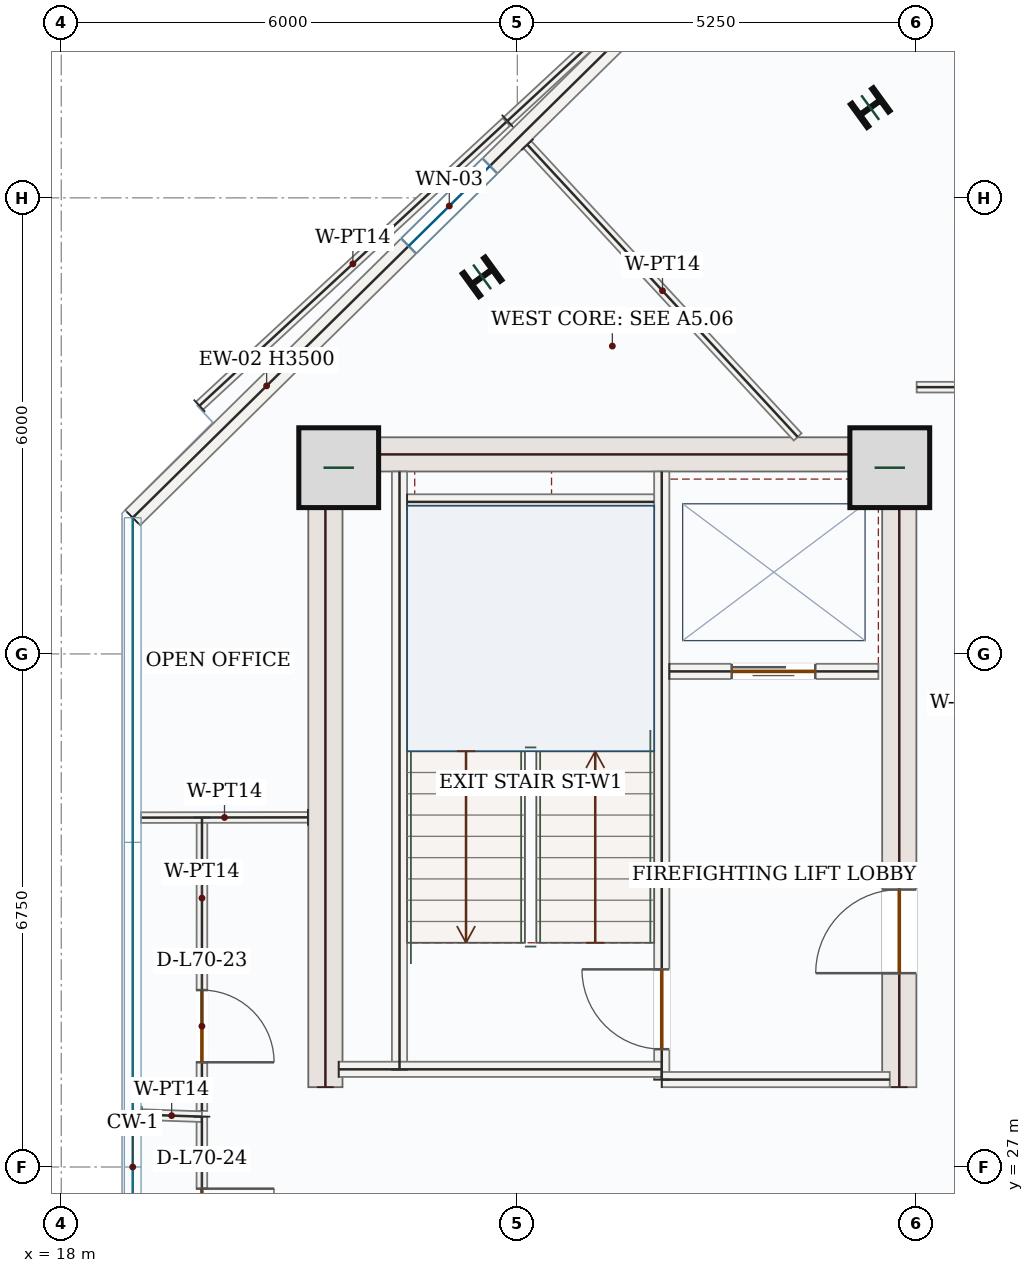
"""IFC4 building model, lengths in metres.
Left out: names, types, materials, properties, quantities, classifications, styles, units other than length and angle.
Written with IfcOpenShell. Run it as: python <this file> out.ifc"""

import sys

from ifc_helpers import new_model, si_unit, direction, frame, frame_2d, origin, origin_2d, place, context, subcontext, project, spatial, rectangle, i_section, extrude, source, transform, mapped, element, fill, save


model = new_model("IFC4")
c1 = context("Model", 3, precision=1e-05, world=origin(), true_north=direction((0.0, 1.0)))
c2 = subcontext(c1, "Body", "Model", "MODEL_VIEW")
j1 = project(units=[si_unit("LENGTHUNIT", "METRE"), si_unit("PLANEANGLEUNIT", "RADIAN")], contexts=[c1])
p1 = place(None, origin())
s1 = spatial("IfcSite", under=j1, at=p1, CompositionType="ELEMENT")
p2 = place(p1, origin())
s2 = spatial("IfcBuilding", under=s1, at=p2, CompositionType="ELEMENT")
p3 = place(p2, frame((0.0, 0.0, 291.6)))
s3 = spatial("IfcBuildingStorey", under=s2, at=p3, CompositionType="ELEMENT", Elevation=291.6)
m1 = source(origin(), c2, "Body", "SweptSolid", [
    extrude(rectangle(XDim=8.55, YDim=0.45, at=frame_2d((4.275, 0.0))), origin(), (0.0, 0.0, 1.0), 3.5),
])
p4 = place(p3, frame((21.475, 28.05, 0.0), z_axis=(0.0, 0.0, 1.0), x_axis=(0.0, 1.0, 0.0)))
e1 = element("IfcWall", 1, at=p4, inside=s3, PredefinedType="SHEAR", context=c2, shape_type="MappedRepresentation", body=[
    mapped(m1, transform((0.0, 0.0, 0.0), x_axis=(1.0, 0.0, 0.0), y_axis=(0.0, 1.0, 0.0), z_axis=(0.0, 0.0, 1.0), scale=1.0)),
])
p5 = place(p3, frame((29.025, 28.05, 0.0), z_axis=(0.0, 0.0, 1.0), x_axis=(0.0, 1.0, 0.0)))
e2 = element("IfcWall", 2, at=p5, inside=s3, PredefinedType="SHEAR", context=c2, shape_type="SweptSolid", body=[
    extrude(rectangle(XDim=8.55, YDim=0.45, at=frame_2d((4.275, 0.0))), origin(), (0.0, 0.0, 1.0), 3.5),
])
p6 = place(p5, frame((1.5, 0.0, 0.0)))
e3 = element("IfcOpeningElement", 3, at=p6, cuts=e2, PredefinedType="OPENING", context=c2, shape_type="SweptSolid", body=[
    extrude(rectangle(XDim=1.1, YDim=2.2, at=frame_2d((0.55, 1.1))), frame((0.0, 0.235, 0.0), z_axis=(0.0, -1.0, 0.0), x_axis=(1.0, 0.0, 0.0)), (0.0, 0.0, 1.0), 0.47),
])
m2 = source(origin(), c2, "Body", "SweptSolid", [
    extrude(rectangle(XDim=7.1, YDim=0.45, at=frame_2d((3.55, 0.0))), origin(), (0.0, 0.0, 1.0), 3.5),
])
p7 = place(p3, frame((21.7, 36.375, 0.0), z_axis=(0.0, 0.0, 1.0), x_axis=(1.0, 0.0, 0.0)))
e4 = element("IfcWall", 4, at=p7, inside=s3, PredefinedType="SHEAR", context=c2, shape_type="MappedRepresentation", body=[
    mapped(m2, transform((0.0, 0.0, 0.0), x_axis=(1.0, 0.0, 0.0), y_axis=(0.0, 1.0, 0.0), z_axis=(0.0, 0.0, 1.0), scale=1.0)),
])
m3 = source(origin(), c2, "Body", "SweptSolid", [
    extrude(rectangle(XDim=1.05, YDim=1.05, at=origin_2d()), origin(), (0.0, 0.0, 1.0), 3.75),
])
for number, where, z_axis, x_axis in (
    (5, (21.65, 36.2, 0.0), (0.0, 0.0, 1.0), (1.0, 0.0, 0.0)),
    (6, (28.9, 36.2, 0.0), (0.0, 0.0, 1.0), (1.0, 0.0, 0.0)),
):
    element("IfcColumn", number, at=place(p3, frame(where, z_axis=z_axis, x_axis=x_axis)), inside=s3, PredefinedType="COLUMN", context=c2, shape_type="MappedRepresentation", body=[
        mapped(m3, transform((0.0, 0.0, 0.0), x_axis=(1.0, 0.0, 0.0), y_axis=(0.0, 1.0, 0.0), z_axis=(0.0, 0.0, 1.0), scale=1.0)),
    ])
m4 = source(origin(), c2, "Body", "SweptSolid", [
    extrude(i_section(OverallWidth=0.374, OverallDepth=0.372, WebThickness=0.016, FlangeThickness=0.026, FilletRadius=0.018, at=origin_2d()), origin(), (0.0, 0.0, 1.0), 3.75),
])
for number, where, z_axis, x_axis in (
    (7, (28.643, 40.937, 0.0), (0.0, 0.0, 1.0), (-0.588, 0.809, 0.0)),
    (8, (23.536, 38.711, 0.0), (0.0, 0.0, 1.0), (-0.588, 0.809, 0.0)),
):
    element("IfcColumn", number, at=place(p3, frame(where, z_axis=z_axis, x_axis=x_axis)), inside=s3, PredefinedType="COLUMN", context=c2, shape_type="MappedRepresentation", body=[
        mapped(m4, transform((0.0, 0.0, 0.0), x_axis=(1.0, 0.0, 0.0), y_axis=(0.0, 1.0, 0.0), z_axis=(0.0, 0.0, 1.0), scale=1.0)),
    ])
p8 = place(p3, frame((18.94, 35.542, 0.0), z_axis=(0.0, 0.0, 1.0), x_axis=(0.712557502542, 0.701613715353, 0.0)))
e9 = element("IfcWall", 9, at=p8, inside=s3, PredefinedType="SOLIDWALL", context=c2, shape_type="SweptSolid", body=[
    extrude(rectangle(XDim=11.69, YDim=0.28, at=frame_2d((5.845, 0.0))), origin(), (0.0, 0.0, 1.0), 3.5),
])
p9 = place(p8, frame((5.095, 0.0, 0.85)))
e10 = element("IfcOpeningElement", 10, at=p9, cuts=e9, PredefinedType="OPENING", context=c2, shape_type="SweptSolid", body=[
    extrude(rectangle(XDim=1.5, YDim=1.5, at=frame_2d((0.75, 0.75))), frame((0.0, 0.15, 0.0), z_axis=(0.0, -1.0, 0.0), x_axis=(1.0, 0.0, 0.0)), (0.0, 0.0, 1.0), 0.3),
])
p10 = place(p3, frame((29.672, 43.65, 0.0), z_axis=(0.0, 0.0, 1.0), x_axis=(0.679010627727, -0.734128440693, 0.0)))
e11 = element("IfcWall", 11, at=p10, inside=s3, PredefinedType="SOLIDWALL", context=c2, shape_type="SweptSolid", body=[
    extrude(rectangle(XDim=5.98, YDim=0.28, at=frame_2d((2.99, 0.0))), origin(), (0.0, 0.0, 1.0), 3.5),
])
p11 = place(p10, frame((2.24, 0.0, 0.85)))
e12 = element("IfcOpeningElement", 12, at=p11, cuts=e11, PredefinedType="OPENING", context=c2, shape_type="SweptSolid", body=[
    extrude(rectangle(XDim=1.5, YDim=1.5, at=frame_2d((0.75, 0.75))), frame((0.0, 0.15, 0.0), z_axis=(0.0, -1.0, 0.0), x_axis=(1.0, 0.0, 0.0)), (0.0, 0.0, 1.0), 0.3),
])
m5 = source(origin(), c2, "Body", "SweptSolid", [
    extrude(rectangle(XDim=7.87, YDim=0.2, at=frame_2d((3.935, 0.0))), origin(), (0.0, 0.0, 1.0), 3.5),
])
p12 = place(p3, frame((22.45, 28.28, 0.0), z_axis=(0.0, 0.0, 1.0), x_axis=(0.0, 1.0, 0.0)))
e13 = element("IfcWall", 13, at=p12, inside=s3, PredefinedType="SOLIDWALL", context=c2, shape_type="MappedRepresentation", body=[
    mapped(m5, transform((0.0, 0.0, 0.0), x_axis=(1.0, 0.0, 0.0), y_axis=(0.0, 1.0, 0.0), z_axis=(0.0, 0.0, 1.0), scale=1.0)),
])
p13 = place(p3, frame((25.9, 28.15, 0.0), z_axis=(0.0, 0.0, 1.0), x_axis=(0.0, 1.0, 0.0)))
e14 = element("IfcWall", 14, at=p13, inside=s3, PredefinedType="SOLIDWALL", context=c2, shape_type="SweptSolid", body=[
    extrude(rectangle(XDim=8.0, YDim=0.2, at=frame_2d((4.0, 0.0))), origin(), (0.0, 0.0, 1.0), 3.5),
])
p14 = place(p13, frame((0.4, 0.0, 0.0)))
e15 = element("IfcOpeningElement", 15, at=p14, cuts=e14, PredefinedType="OPENING", context=c2, shape_type="SweptSolid", body=[
    extrude(rectangle(XDim=1.05, YDim=2.15, at=frame_2d((0.525, 1.075))), frame((0.0, 0.11, 0.0), z_axis=(0.0, -1.0, 0.0), x_axis=(1.0, 0.0, 0.0)), (0.0, 0.0, 1.0), 0.22),
])
m6 = source(origin(), c2, "Body", "SweptSolid", [
    extrude(rectangle(XDim=4.25, YDim=0.2, at=frame_2d((2.125, 0.0))), origin(), (0.0, 0.0, 1.0), 3.5),
])
p15 = place(p3, frame((21.65, 28.285, 0.0), z_axis=(0.0, 0.0, 1.0), x_axis=(1.0, 0.0, 0.0)))
e16 = element("IfcWall", 16, at=p15, inside=s3, PredefinedType="SOLIDWALL", context=c2, shape_type="MappedRepresentation", body=[
    mapped(m6, transform((0.0, 0.0, 0.0), x_axis=(1.0, 0.0, 0.0), y_axis=(0.0, 1.0, 0.0), z_axis=(0.0, 0.0, 1.0), scale=1.0)),
])
m7 = source(origin(), c2, "Body", "SweptSolid", [
    extrude(rectangle(XDim=3.0, YDim=0.2, at=frame_2d((1.5, 0.0))), origin(), (0.0, 0.0, 1.0), 3.5),
])
p16 = place(p3, frame((25.9, 28.15, 0.0), z_axis=(0.0, 0.0, 1.0), x_axis=(1.0, 0.0, 0.0)))
e17 = element("IfcWall", 17, at=p16, inside=s3, PredefinedType="SOLIDWALL", context=c2, shape_type="MappedRepresentation", body=[
    mapped(m7, transform((0.0, 0.0, 0.0), x_axis=(1.0, 0.0, 0.0), y_axis=(0.0, 1.0, 0.0), z_axis=(0.0, 0.0, 1.0), scale=1.0)),
])
m8 = source(origin(), c2, "Body", "SweptSolid", [
    extrude(rectangle(XDim=3.25, YDim=0.2, at=frame_2d((1.625, 0.0))), origin(), (0.0, 0.0, 1.0), 3.5),
])
p17 = place(p3, frame((22.55, 35.75, 0.0), z_axis=(0.0, 0.0, 1.0), x_axis=(1.0, 0.0, 0.0)))
e18 = element("IfcWall", 18, at=p17, inside=s3, PredefinedType="SOLIDWALL", context=c2, shape_type="MappedRepresentation", body=[
    mapped(m8, transform((0.0, 0.0, 0.0), x_axis=(1.0, 0.0, 0.0), y_axis=(0.0, 1.0, 0.0), z_axis=(0.0, 0.0, 1.0), scale=1.0)),
])
p18 = place(p3, frame((26.0, 33.52, 0.0), z_axis=(0.0, 0.0, 1.0), x_axis=(1.0, 0.0, 0.0)))
e19 = element("IfcWall", 19, at=p18, inside=s3, PredefinedType="SOLIDWALL", context=c2, shape_type="SweptSolid", body=[
    extrude(rectangle(XDim=2.75, YDim=0.2, at=frame_2d((1.375, 0.0))), origin(), (0.0, 0.0, 1.0), 3.5),
])
p19 = place(p18, frame((0.82, 0.0, 0.0)))
e20 = element("IfcOpeningElement", 20, at=p19, cuts=e19, PredefinedType="OPENING", context=c2, shape_type="SweptSolid", body=[
    extrude(rectangle(XDim=1.1, YDim=2.15, at=frame_2d((0.55, 1.075))), frame((0.0, 0.11, 0.0), z_axis=(0.0, -1.0, 0.0), x_axis=(1.0, 0.0, 0.0)), (0.0, 0.0, 1.0), 0.22),
])
p20 = place(p3, frame((19.85, 27.662, 0.0), z_axis=(0.0, 0.0, 1.0), x_axis=(0.0, -1.0, 0.0)))
e21 = element("IfcWall", 21, at=p20, inside=s3, PredefinedType="PARTITIONING", context=c2, shape_type="SweptSolid", body=[
    extrude(rectangle(XDim=5.256, YDim=0.14, at=frame_2d((2.628, 0.0))), origin(), (0.0, 0.0, 1.0), 3.5),
])
p21 = place(p20, frame((0.948, 0.0, 0.0)))
e22 = element("IfcOpeningElement", 22, at=p21, cuts=e21, PredefinedType="OPENING", context=c2, shape_type="SweptSolid", body=[
    extrude(rectangle(XDim=0.95, YDim=2.15, at=frame_2d((0.475, 1.075))), frame((0.0, 0.08, 0.0), z_axis=(0.0, -1.0, 0.0), x_axis=(1.0, 0.0, 0.0)), (0.0, 0.0, 1.0), 0.16),
])
m9 = source(origin(), c2, "Body", "SweptSolid", [
    extrude(rectangle(XDim=0.795, YDim=0.14, at=frame_2d((0.397, 0.0))), origin(), (0.0, 0.0, 1.0), 3.5),
])
p22 = place(p3, frame((19.055, 27.689, 0.0), z_axis=(0.0, 0.0, 1.0), x_axis=(0.999418697686, -0.034092033019, 0.0)))
e23 = element("IfcWall", 23, at=p22, inside=s3, PredefinedType="PARTITIONING", context=c2, shape_type="MappedRepresentation", body=[
    mapped(m9, transform((0.0, 0.0, 0.0), x_axis=(1.0, 0.0, 0.0), y_axis=(0.0, 1.0, 0.0), z_axis=(0.0, 0.0, 1.0), scale=1.0)),
])
p23 = place(p3, frame((19.851, 31.598, 0.0), z_axis=(0.0, 0.0, 1.0), x_axis=(-0.000316215517, -0.999999950004, 0.0)))
e24 = element("IfcWall", 24, at=p23, inside=s3, PredefinedType="PARTITIONING", context=c2, shape_type="SweptSolid", body=[
    extrude(rectangle(XDim=3.86, YDim=0.14, at=frame_2d((1.93, 0.0))), origin(), (0.0, 0.0, 1.0), 3.5),
])
p24 = place(p23, frame((2.27, 0.0, 0.0)))
e25 = element("IfcOpeningElement", 25, at=p24, cuts=e24, PredefinedType="OPENING", context=c2, shape_type="SweptSolid", body=[
    extrude(rectangle(XDim=0.95, YDim=2.15, at=frame_2d((0.475, 1.075))), frame((0.0, 0.08, 0.0), z_axis=(0.0, -1.0, 0.0), x_axis=(1.0, 0.0, 0.0)), (0.0, 0.0, 1.0), 0.16),
])
m10 = source(origin(), c2, "Body", "SweptSolid", [
    extrude(rectangle(XDim=5.5, YDim=0.14, at=frame_2d((2.75, 0.0))), origin(), (0.0, 0.0, 1.0), 3.5),
])
p25 = place(p3, frame((19.818, 37.015, 0.0), z_axis=(0.0, 0.0, 1.0), x_axis=(0.734137611872, 0.679000711954, 0.0)))
e26 = element("IfcWall", 26, at=p25, inside=s3, PredefinedType="PARTITIONING", context=c2, shape_type="MappedRepresentation", body=[
    mapped(m10, transform((0.0, 0.0, 0.0), x_axis=(1.0, 0.0, 0.0), y_axis=(0.0, 1.0, 0.0), z_axis=(0.0, 0.0, 1.0), scale=1.0)),
])
m11 = source(origin(), c2, "Body", "SweptSolid", [
    extrude(rectangle(XDim=5.238, YDim=0.14, at=frame_2d((2.619, 0.0))), origin(), (0.0, 0.0, 1.0), 3.5),
])
p26 = place(p3, frame((24.132, 40.45, 0.0), z_axis=(0.0, 0.0, 1.0), x_axis=(0.67899802156, -0.734140100197, 0.0)))
e27 = element("IfcWall", 27, at=p26, inside=s3, PredefinedType="PARTITIONING", context=c2, shape_type="MappedRepresentation", body=[
    mapped(m11, transform((0.0, 0.0, 0.0), x_axis=(1.0, 0.0, 0.0), y_axis=(0.0, 1.0, 0.0), z_axis=(0.0, 0.0, 1.0), scale=1.0)),
])
m12 = source(origin(), c2, "Body", "SweptSolid", [
    extrude(rectangle(XDim=2.195, YDim=0.14, at=frame_2d((1.098, 0.0))), origin(), (0.0, 0.0, 1.0), 3.5),
])
p27 = place(p3, frame((21.245, 31.6, 0.0), z_axis=(0.0, 0.0, 1.0), x_axis=(-0.999998787702, -0.001557110781, 0.0)))
e28 = element("IfcWall", 28, at=p27, inside=s3, PredefinedType="PARTITIONING", context=c2, shape_type="MappedRepresentation", body=[
    mapped(m12, transform((0.0, 0.0, 0.0), x_axis=(1.0, 0.0, 0.0), y_axis=(0.0, 1.0, 0.0), z_axis=(0.0, 0.0, 1.0), scale=1.0)),
])
m13 = source(origin(), c2, "Body", "SweptSolid", [
    extrude(rectangle(XDim=3.722, YDim=0.14, at=frame_2d((1.861, 0.0))), origin(), (0.0, 0.0, 1.0), 3.5),
])
p28 = place(p3, frame((23.87, 40.763, 0.0), z_axis=(0.0, 0.0, 1.0), x_axis=(0.734119057589, 0.679020772352, 0.0)))
e29 = element("IfcWall", 29, at=p28, inside=s3, PredefinedType="PARTITIONING", context=c2, shape_type="MappedRepresentation", body=[
    mapped(m13, transform((0.0, 0.0, 0.0), x_axis=(1.0, 0.0, 0.0), y_axis=(0.0, 1.0, 0.0), z_axis=(0.0, 0.0, 1.0), scale=1.0)),
])
p29 = place(p3, frame((36.39, 37.26, 0.0), z_axis=(0.0, 0.0, 1.0), x_axis=(-0.999999997659, -6.8420512e-05, 0.0)))
e30 = element("IfcWall", 30, at=p29, inside=s3, PredefinedType="PARTITIONING", context=c2, shape_type="SweptSolid", body=[
    extrude(rectangle(XDim=7.136, YDim=0.14, at=frame_2d((3.568, 0.0))), origin(), (0.0, 0.0, 1.0), 3.5),
])
p30 = place(p29, frame((1.361, 0.0, 0.0)))
e31 = element("IfcOpeningElement", 31, at=p30, cuts=e30, PredefinedType="OPENING", context=c2, shape_type="SweptSolid", body=[
    extrude(rectangle(XDim=0.95, YDim=2.15, at=frame_2d((0.475, 1.075))), frame((0.0, 0.08, 0.0), z_axis=(0.0, -1.0, 0.0), x_axis=(1.0, 0.0, 0.0)), (0.0, 0.0, 1.0), 0.16),
])
m14 = source(origin(), c2, "Body", "SweptSolid", [
    extrude(rectangle(XDim=1.5, YDim=1.5, at=frame_2d((0.75, 0.75))), frame((0.0, 0.03, 0.0), z_axis=(0.0, -1.0, 0.0), x_axis=(1.0, 0.0, 0.0)), (0.0, 0.0, 1.0), 0.06),
])
p31 = place(p9, origin())
e32 = element("IfcWindow", 32, at=p31, inside=s3, PartitioningType="SINGLE_PANEL", PredefinedType="WINDOW", context=c2, shape_type="MappedRepresentation", body=[
    mapped(m14, transform((0.0, 0.0, 0.0), x_axis=(1.0, 0.0, 0.0), y_axis=(0.0, 1.0, 0.0), z_axis=(0.0, 0.0, 1.0), scale=1.0)),
])
fill(e10, e32)
m15 = source(origin(), c2, "Body", "SweptSolid", [
    extrude(rectangle(XDim=1.05, YDim=2.15, at=frame_2d((0.525, 1.075))), frame((0.0, 0.025, 0.0), z_axis=(0.0, -1.0, 0.0), x_axis=(1.0, 0.0, 0.0)), (0.0, 0.0, 1.0), 0.05),
])
p32 = place(p14, origin())
e33 = element("IfcDoor", 33, at=p32, inside=s3, OperationType="SINGLE_SWING_RIGHT", PredefinedType="DOOR", context=c2, shape_type="MappedRepresentation", body=[
    mapped(m15, transform((0.0, 0.0, 0.0), x_axis=(1.0, 0.0, 0.0), y_axis=(0.0, 1.0, 0.0), z_axis=(0.0, 0.0, 1.0), scale=1.0)),
])
fill(e15, e33)
m16 = source(origin(), c2, "Body", "SweptSolid", [
    extrude(rectangle(XDim=1.1, YDim=2.15, at=frame_2d((0.55, 1.075))), frame((0.0, 0.025, 0.0), z_axis=(0.0, -1.0, 0.0), x_axis=(1.0, 0.0, 0.0)), (0.0, 0.0, 1.0), 0.05),
])
p33 = place(p19, origin())
e34 = element("IfcDoor", 34, at=p33, inside=s3, OperationType="DOUBLE_DOOR_SLIDING", PredefinedType="DOOR", context=c2, shape_type="MappedRepresentation", body=[
    mapped(m16, transform((0.0, 0.0, 0.0), x_axis=(1.0, 0.0, 0.0), y_axis=(0.0, 1.0, 0.0), z_axis=(0.0, 0.0, 1.0), scale=1.0)),
])
fill(e20, e34)
m17 = source(origin(), c2, "Body", "SweptSolid", [
    extrude(rectangle(XDim=1.1, YDim=2.2, at=frame_2d((0.55, 1.1))), frame((0.0, 0.025, 0.0), z_axis=(0.0, -1.0, 0.0), x_axis=(1.0, 0.0, 0.0)), (0.0, 0.0, 1.0), 0.05),
])
p34 = place(p6, origin())
e35 = element("IfcDoor", 35, at=p34, inside=s3, OperationType="SINGLE_SWING_LEFT", PredefinedType="DOOR", context=c2, shape_type="MappedRepresentation", body=[
    mapped(m17, transform((0.0, 0.0, 0.0), x_axis=(1.0, 0.0, 0.0), y_axis=(0.0, 1.0, 0.0), z_axis=(0.0, 0.0, 1.0), scale=1.0)),
])
fill(e3, e35)
m18 = source(origin(), c2, "Body", "SweptSolid", [
    extrude(rectangle(XDim=0.95, YDim=2.15, at=frame_2d((0.475, 1.075))), frame((0.0, 0.025, 0.0), z_axis=(0.0, -1.0, 0.0), x_axis=(1.0, 0.0, 0.0)), (0.0, 0.0, 1.0), 0.05),
])
p35 = place(p24, origin())
e36 = element("IfcDoor", 36, at=p35, inside=s3, OperationType="SINGLE_SWING_RIGHT", PredefinedType="DOOR", context=c2, shape_type="MappedRepresentation", body=[
    mapped(m18, transform((0.0, 0.0, 0.0), x_axis=(1.0, 0.0, 0.0), y_axis=(0.0, 1.0, 0.0), z_axis=(0.0, 0.0, 1.0), scale=1.0)),
])
fill(e25, e36)
p36 = place(p21, origin())
e37 = element("IfcDoor", 37, at=p36, inside=s3, OperationType="SINGLE_SWING_LEFT", PredefinedType="DOOR", context=c2, shape_type="MappedRepresentation", body=[
    mapped(m18, transform((0.0, 0.0, 0.0), x_axis=(1.0, 0.0, 0.0), y_axis=(0.0, 1.0, 0.0), z_axis=(0.0, 0.0, 1.0), scale=1.0)),
])
fill(e22, e37)
save(model, sys.argv[1])
